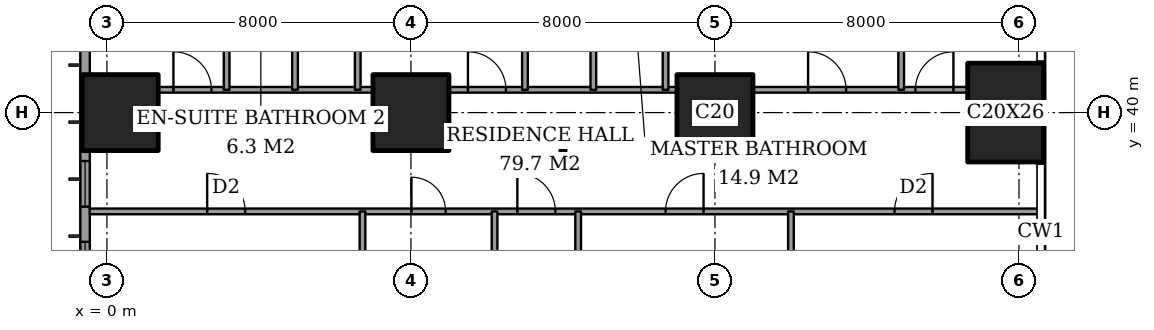
"""IFC4 building model, lengths in metres.
Left out: names, types, materials, properties, quantities, classifications, styles, units other than length and angle.
Written with IfcOpenShell. Run it as: python <this file> out.ifc"""

import sys

from ifc_helpers import new_model, si_unit, direction, frame, frame_2d, origin, origin_2d, place, context, subcontext, project, spatial, rectangle, extrude, element, fill, save


model = new_model("IFC4")
c1 = context("Model", 3, precision=1e-05, world=origin(), true_north=direction((0.0, 1.0)))
c2 = subcontext(c1, "Body", "Model", "MODEL_VIEW")
j1 = project(units=[si_unit("LENGTHUNIT", "METRE"), si_unit("PLANEANGLEUNIT", "RADIAN")], contexts=[c1])
p1 = place(None, origin())
s1 = spatial("IfcSite", under=j1, at=p1, CompositionType="ELEMENT")
p2 = place(p1, origin())
s2 = spatial("IfcBuilding", under=s1, at=p2, CompositionType="ELEMENT")
p3 = place(p2, frame((0.0, 0.0, 117.8)))
s3 = spatial("IfcBuildingStorey", under=s2, at=p3, CompositionType="ELEMENT", Elevation=117.8)
for number, where, z_axis, x_axis in (
    (1, (0.35, 40.0, 0.0), (0.0, 0.0, 1.0), (1.0, 0.0, 0.0)),
    (2, (8.0, 40.0, 0.0), (0.0, 0.0, 1.0), (1.0, 0.0, 0.0)),
    (3, (16.0, 40.0, 0.0), (0.0, 0.0, 1.0), (1.0, 0.0, 0.0)),
):
    element("IfcColumn", number, at=place(p3, frame(where, z_axis=z_axis, x_axis=x_axis)), inside=s3, PredefinedType="COLUMN", context=c2, shape_type="SweptSolid", body=[
        extrude(rectangle(XDim=2.0, YDim=2.0, at=origin_2d()), origin(), (0.0, 0.0, 1.0), 3.6),
    ])
p4 = place(p3, frame((23.65, 40.0, 0.0), z_axis=(0.0, 0.0, 1.0), x_axis=(1.0, 0.0, 0.0)))
e4 = element("IfcColumn", 4, at=p4, inside=s3, PredefinedType="COLUMN", context=c2, shape_type="SweptSolid", body=[
    extrude(rectangle(XDim=2.0, YDim=2.6, at=origin_2d()), origin(), (0.0, 0.0, 1.0), 3.6),
])
p5 = place(p3, frame((-0.575, 44.825, 0.0), z_axis=(0.0, 0.0, 1.0), x_axis=(0.0, -1.0, 0.0)))
e5 = element("IfcWall", 5, at=p5, inside=s3, PredefinedType="SOLIDWALL", context=c2, shape_type="SweptSolid", body=[
    extrude(rectangle(XDim=41.65, YDim=0.25, at=frame_2d((20.825, 0.0))), origin(), (0.0, 0.0, 1.0), 3.6),
])
p6 = place(p5, frame((0.775, 0.0, 0.4)))
e6 = element("IfcOpeningElement", 6, at=p6, cuts=e5, PredefinedType="OPENING", context=c2, shape_type="SweptSolid", body=[
    extrude(rectangle(XDim=2.4, YDim=2.2, at=frame_2d((1.2, 1.1))), frame((0.0, 0.135, 0.0), z_axis=(0.0, -1.0, 0.0), x_axis=(1.0, 0.0, 0.0)), (0.0, 0.0, 1.0), 0.27),
])
p7 = place(p5, frame((6.1, 0.0, 0.4)))
e7 = element("IfcOpeningElement", 7, at=p7, cuts=e5, PredefinedType="OPENING", context=c2, shape_type="SweptSolid", body=[
    extrude(rectangle(XDim=1.2, YDim=2.2, at=frame_2d((0.6, 1.1))), frame((0.0, 0.135, 0.0), z_axis=(0.0, -1.0, 0.0), x_axis=(1.0, 0.0, 0.0)), (0.0, 0.0, 1.0), 0.27),
])
p8 = place(p5, frame((8.225, 0.0, 0.4)))
e8 = element("IfcOpeningElement", 8, at=p8, cuts=e5, PredefinedType="OPENING", context=c2, shape_type="SweptSolid", body=[
    extrude(rectangle(XDim=2.4, YDim=2.2, at=frame_2d((1.2, 1.1))), frame((0.0, 0.135, 0.0), z_axis=(0.0, -1.0, 0.0), x_axis=(1.0, 0.0, 0.0)), (0.0, 0.0, 1.0), 0.27),
])
p9 = place(p5, frame((15.625, 0.0, 0.4)))
e9 = element("IfcOpeningElement", 9, at=p9, cuts=e5, PredefinedType="OPENING", context=c2, shape_type="SweptSolid", body=[
    extrude(rectangle(XDim=2.4, YDim=2.2, at=frame_2d((1.2, 1.1))), frame((0.0, 0.135, 0.0), z_axis=(0.0, -1.0, 0.0), x_axis=(1.0, 0.0, 0.0)), (0.0, 0.0, 1.0), 0.27),
])
p10 = place(p5, frame((23.625, 0.0, 0.4)))
e10 = element("IfcOpeningElement", 10, at=p10, cuts=e5, PredefinedType="OPENING", context=c2, shape_type="SweptSolid", body=[
    extrude(rectangle(XDim=2.4, YDim=2.2, at=frame_2d((1.2, 1.1))), frame((0.0, 0.135, 0.0), z_axis=(0.0, -1.0, 0.0), x_axis=(1.0, 0.0, 0.0)), (0.0, 0.0, 1.0), 0.27),
])
p11 = place(p5, frame((30.825, 0.0, 0.4)))
e11 = element("IfcOpeningElement", 11, at=p11, cuts=e5, PredefinedType="OPENING", context=c2, shape_type="SweptSolid", body=[
    extrude(rectangle(XDim=2.4, YDim=2.2, at=frame_2d((1.2, 1.1))), frame((0.0, 0.135, 0.0), z_axis=(0.0, -1.0, 0.0), x_axis=(1.0, 0.0, 0.0)), (0.0, 0.0, 1.0), 0.27),
])
p12 = place(p5, frame((34.5, 0.0, 0.4)))
e12 = element("IfcOpeningElement", 12, at=p12, cuts=e5, PredefinedType="OPENING", context=c2, shape_type="SweptSolid", body=[
    extrude(rectangle(XDim=1.2, YDim=2.2, at=frame_2d((0.6, 1.1))), frame((0.0, 0.135, 0.0), z_axis=(0.0, -1.0, 0.0), x_axis=(1.0, 0.0, 0.0)), (0.0, 0.0, 1.0), 0.27),
])
p13 = place(p5, frame((38.475, 0.0, 0.4)))
e13 = element("IfcOpeningElement", 13, at=p13, cuts=e5, PredefinedType="OPENING", context=c2, shape_type="SweptSolid", body=[
    extrude(rectangle(XDim=2.4, YDim=2.2, at=frame_2d((1.2, 1.1))), frame((0.0, 0.135, 0.0), z_axis=(0.0, -1.0, 0.0), x_axis=(1.0, 0.0, 0.0)), (0.0, 0.0, 1.0), 0.27),
])
p14 = place(p3, frame((-0.45, 37.4, 0.0), z_axis=(0.0, 0.0, 1.0), x_axis=(1.0, 0.0, 0.0)))
e14 = element("IfcWall", 14, at=p14, inside=s3, PredefinedType="PARTITIONING", context=c2, shape_type="SweptSolid", body=[
    extrude(rectangle(XDim=25.011, YDim=0.15, at=frame_2d((12.505, 0.0))), origin(), (0.0, 0.0, 1.0), 3.35),
])
p15 = place(p14, frame((11.25, 0.0, 0.0)))
e15 = element("IfcOpeningElement", 15, at=p15, cuts=e14, PredefinedType="OPENING", context=c2, shape_type="SweptSolid", body=[
    extrude(rectangle(XDim=1.0, YDim=2.1, at=frame_2d((0.5, 1.05))), frame((0.0, 0.085, 0.0), z_axis=(0.0, -1.0, 0.0), x_axis=(1.0, 0.0, 0.0)), (0.0, 0.0, 1.0), 0.17),
])
p16 = place(p14, frame((3.087, 0.0, 0.0)))
e16 = element("IfcOpeningElement", 16, at=p16, cuts=e14, PredefinedType="OPENING", context=c2, shape_type="SweptSolid", body=[
    extrude(rectangle(XDim=1.0, YDim=2.1, at=frame_2d((0.5, 1.05))), frame((0.0, 0.085, 0.0), z_axis=(0.0, -1.0, 0.0), x_axis=(1.0, 0.0, 0.0)), (0.0, 0.0, 1.0), 0.17),
])
p17 = place(p14, frame((8.462, 0.0, 0.0)))
e17 = element("IfcOpeningElement", 17, at=p17, cuts=e14, PredefinedType="OPENING", context=c2, shape_type="SweptSolid", body=[
    extrude(rectangle(XDim=0.9, YDim=2.1, at=frame_2d((0.45, 1.05))), frame((0.0, 0.085, 0.0), z_axis=(0.0, -1.0, 0.0), x_axis=(1.0, 0.0, 0.0)), (0.0, 0.0, 1.0), 0.17),
])
p18 = place(p14, frame((15.15, 0.0, 0.0)))
e18 = element("IfcOpeningElement", 18, at=p18, cuts=e14, PredefinedType="OPENING", context=c2, shape_type="SweptSolid", body=[
    extrude(rectangle(XDim=1.0, YDim=2.1, at=frame_2d((0.5, 1.05))), frame((0.0, 0.085, 0.0), z_axis=(0.0, -1.0, 0.0), x_axis=(1.0, 0.0, 0.0)), (0.0, 0.0, 1.0), 0.17),
])
p19 = place(p14, frame((21.175, 0.0, 0.0)))
e19 = element("IfcOpeningElement", 19, at=p19, cuts=e14, PredefinedType="OPENING", context=c2, shape_type="SweptSolid", body=[
    extrude(rectangle(XDim=1.0, YDim=2.1, at=frame_2d((0.5, 1.05))), frame((0.0, 0.085, 0.0), z_axis=(0.0, -1.0, 0.0), x_axis=(1.0, 0.0, 0.0)), (0.0, 0.0, 1.0), 0.17),
])
p20 = place(p3, frame((1.35, 40.6, 0.0), z_axis=(0.0, 0.0, 1.0), x_axis=(1.0, 0.0, 0.0)))
e20 = element("IfcWall", 20, at=p20, inside=s3, PredefinedType="PARTITIONING", context=c2, shape_type="SweptSolid", body=[
    extrude(rectangle(XDim=5.65, YDim=0.15, at=frame_2d((2.825, 0.0))), origin(), (0.0, 0.0, 1.0), 3.35),
])
p21 = place(p20, frame((0.4, 0.0, 0.0)))
e21 = element("IfcOpeningElement", 21, at=p21, cuts=e20, PredefinedType="OPENING", context=c2, shape_type="SweptSolid", body=[
    extrude(rectangle(XDim=1.0, YDim=2.1, at=frame_2d((0.5, 1.05))), frame((0.0, 0.085, 0.0), z_axis=(0.0, -1.0, 0.0), x_axis=(1.0, 0.0, 0.0)), (0.0, 0.0, 1.0), 0.17),
])
p22 = place(p3, frame((9.0, 40.6, 0.0), z_axis=(0.0, 0.0, 1.0), x_axis=(1.0, 0.0, 0.0)))
e22 = element("IfcWall", 22, at=p22, inside=s3, PredefinedType="PARTITIONING", context=c2, shape_type="SweptSolid", body=[
    extrude(rectangle(XDim=6.0, YDim=0.15, at=frame_2d((3.0, 0.0))), origin(), (0.0, 0.0, 1.0), 3.35),
])
p23 = place(p22, frame((0.5, 0.0, 0.0)))
e23 = element("IfcOpeningElement", 23, at=p23, cuts=e22, PredefinedType="OPENING", context=c2, shape_type="SweptSolid", body=[
    extrude(rectangle(XDim=1.0, YDim=2.1, at=frame_2d((0.5, 1.05))), frame((0.0, 0.085, 0.0), z_axis=(0.0, -1.0, 0.0), x_axis=(1.0, 0.0, 0.0)), (0.0, 0.0, 1.0), 0.17),
])
p24 = place(p3, frame((17.0, 40.6, 0.0), z_axis=(0.0, 0.0, 1.0), x_axis=(1.0, 0.0, 0.0)))
e24 = element("IfcWall", 24, at=p24, inside=s3, PredefinedType="PARTITIONING", context=c2, shape_type="SweptSolid", body=[
    extrude(rectangle(XDim=5.65, YDim=0.15, at=frame_2d((2.825, 0.0))), origin(), (0.0, 0.0, 1.0), 3.35),
])
p25 = place(p24, frame((1.45, 0.0, 0.0)))
e25 = element("IfcOpeningElement", 25, at=p25, cuts=e24, PredefinedType="OPENING", context=c2, shape_type="SweptSolid", body=[
    extrude(rectangle(XDim=1.0, YDim=2.1, at=frame_2d((0.5, 1.05))), frame((0.0, 0.085, 0.0), z_axis=(0.0, -1.0, 0.0), x_axis=(1.0, 0.0, 0.0)), (0.0, 0.0, 1.0), 0.17),
])
p26 = place(p24, frame((4.275, 0.0, 0.0)))
e26 = element("IfcOpeningElement", 26, at=p26, cuts=e24, PredefinedType="OPENING", context=c2, shape_type="SweptSolid", body=[
    extrude(rectangle(XDim=1.0, YDim=2.1, at=frame_2d((0.5, 1.05))), frame((0.0, 0.085, 0.0), z_axis=(0.0, -1.0, 0.0), x_axis=(1.0, 0.0, 0.0)), (0.0, 0.0, 1.0), 0.17),
])
p27 = place(p3, frame((3.15, 40.6, 0.0), z_axis=(0.0, 0.0, 1.0), x_axis=(0.0, 1.0, 0.0)))
e27 = element("IfcWall", 27, at=p27, inside=s3, PredefinedType="PARTITIONING", context=c2, shape_type="SweptSolid", body=[
    extrude(rectangle(XDim=3.5, YDim=0.15, at=frame_2d((1.75, 0.0))), origin(), (0.0, 0.0, 1.0), 3.35),
])
p28 = place(p27, frame((1.3, 0.0, 0.0)))
e28 = element("IfcOpeningElement", 28, at=p28, cuts=e27, PredefinedType="OPENING", context=c2, shape_type="SweptSolid", body=[
    extrude(rectangle(XDim=0.9, YDim=2.1, at=frame_2d((0.45, 1.05))), frame((0.0, 0.085, 0.0), z_axis=(0.0, -1.0, 0.0), x_axis=(1.0, 0.0, 0.0)), (0.0, 0.0, 1.0), 0.17),
])
p29 = place(p3, frame((4.95, 40.6, 0.0), z_axis=(0.0, 0.0, 1.0), x_axis=(0.0, 1.0, 0.0)))
e29 = element("IfcWall", 29, at=p29, inside=s3, PredefinedType="PARTITIONING", context=c2, shape_type="SweptSolid", body=[
    extrude(rectangle(XDim=7.85, YDim=0.15, at=frame_2d((3.925, 0.0))), origin(), (0.0, 0.0, 1.0), 3.35),
])
p30 = place(p29, frame((5.225, 0.0, 0.0)))
e30 = element("IfcOpeningElement", 30, at=p30, cuts=e29, PredefinedType="OPENING", context=c2, shape_type="SweptSolid", body=[
    extrude(rectangle(XDim=0.9, YDim=2.1, at=frame_2d((0.45, 1.05))), frame((0.0, 0.085, 0.0), z_axis=(0.0, -1.0, 0.0), x_axis=(1.0, 0.0, 0.0)), (0.0, 0.0, 1.0), 0.17),
])
p31 = place(p3, frame((6.6, 40.6, 0.0), z_axis=(0.0, 0.0, 1.0), x_axis=(0.0, 1.0, 0.0)))
e31 = element("IfcWall", 31, at=p31, inside=s3, PredefinedType="PARTITIONING", context=c2, shape_type="SweptSolid", body=[
    extrude(rectangle(XDim=7.85, YDim=0.15, at=frame_2d((3.925, 0.0))), origin(), (0.0, 0.0, 1.0), 3.35),
])
p32 = place(p3, frame((6.725, 33.2, 0.0), z_axis=(0.0, 0.0, 1.0), x_axis=(0.0, 1.0, 0.0)))
e32 = element("IfcWall", 32, at=p32, inside=s3, PredefinedType="PARTITIONING", context=c2, shape_type="SweptSolid", body=[
    extrude(rectangle(XDim=4.2, YDim=0.15, at=frame_2d((2.1, 0.0))), origin(), (0.0, 0.0, 1.0), 3.35),
])
p33 = place(p3, frame((10.2, 28.0, 0.0), z_axis=(0.0, 0.0, 1.0), x_axis=(0.0, 1.0, 0.0)))
e33 = element("IfcWall", 33, at=p33, inside=s3, PredefinedType="PARTITIONING", context=c2, shape_type="SweptSolid", body=[
    extrude(rectangle(XDim=9.4, YDim=0.15, at=frame_2d((4.7, 0.0))), origin(), (0.0, 0.0, 1.0), 3.35),
])
p34 = place(p33, frame((0.837, 0.0, 0.0)))
e34 = element("IfcOpeningElement", 34, at=p34, cuts=e33, PredefinedType="OPENING", context=c2, shape_type="SweptSolid", body=[
    extrude(rectangle(XDim=1.0, YDim=2.1, at=frame_2d((0.5, 1.05))), frame((0.0, 0.085, 0.0), z_axis=(0.0, -1.0, 0.0), x_axis=(1.0, 0.0, 0.0)), (0.0, 0.0, 1.0), 0.17),
])
p35 = place(p3, frame((11.0, 40.6, 0.0), z_axis=(0.0, 0.0, 1.0), x_axis=(0.0, 1.0, 0.0)))
e35 = element("IfcWall", 35, at=p35, inside=s3, PredefinedType="PARTITIONING", context=c2, shape_type="SweptSolid", body=[
    extrude(rectangle(XDim=7.85, YDim=0.15, at=frame_2d((3.925, 0.0))), origin(), (0.0, 0.0, 1.0), 3.35),
])
p36 = place(p35, frame((3.475, 0.0, 0.0)))
e36 = element("IfcOpeningElement", 36, at=p36, cuts=e35, PredefinedType="OPENING", context=c2, shape_type="SweptSolid", body=[
    extrude(rectangle(XDim=0.9, YDim=2.1, at=frame_2d((0.45, 1.05))), frame((0.0, 0.085, 0.0), z_axis=(0.0, -1.0, 0.0), x_axis=(1.0, 0.0, 0.0)), (0.0, 0.0, 1.0), 0.17),
])
p37 = place(p3, frame((12.4, 30.675, 0.0), z_axis=(0.0, 0.0, 1.0), x_axis=(0.0, 1.0, 0.0)))
e37 = element("IfcWall", 37, at=p37, inside=s3, PredefinedType="PARTITIONING", context=c2, shape_type="SweptSolid", body=[
    extrude(rectangle(XDim=6.725, YDim=0.15, at=frame_2d((3.362, 0.0))), origin(), (0.0, 0.0, 1.0), 3.35),
])
p38 = place(p3, frame((12.8, 40.6, 0.0), z_axis=(0.0, 0.0, 1.0), x_axis=(0.0, 1.0, 0.0)))
e38 = element("IfcWall", 38, at=p38, inside=s3, PredefinedType="PARTITIONING", context=c2, shape_type="SweptSolid", body=[
    extrude(rectangle(XDim=7.85, YDim=0.15, at=frame_2d((3.925, 0.0))), origin(), (0.0, 0.0, 1.0), 3.35),
])
p39 = place(p3, frame((14.7, 40.6, 0.0), z_axis=(0.0, 0.0, 1.0), x_axis=(0.0, 1.0, 0.0)))
e39 = element("IfcWall", 39, at=p39, inside=s3, PredefinedType="PARTITIONING", context=c2, shape_type="SweptSolid", body=[
    extrude(rectangle(XDim=7.85, YDim=0.15, at=frame_2d((3.925, 0.0))), origin(), (0.0, 0.0, 1.0), 3.35),
])
p40 = place(p39, frame((3.475, 0.0, 0.0)))
e40 = element("IfcOpeningElement", 40, at=p40, cuts=e39, PredefinedType="OPENING", context=c2, shape_type="SweptSolid", body=[
    extrude(rectangle(XDim=0.9, YDim=2.1, at=frame_2d((0.45, 1.05))), frame((0.0, 0.085, 0.0), z_axis=(0.0, -1.0, 0.0), x_axis=(1.0, 0.0, 0.0)), (0.0, 0.0, 1.0), 0.17),
])
p41 = place(p3, frame((18.0, 28.0, 0.0), z_axis=(0.0, 0.0, 1.0), x_axis=(0.0, 1.0, 0.0)))
e41 = element("IfcWall", 41, at=p41, inside=s3, PredefinedType="PARTITIONING", context=c2, shape_type="SweptSolid", body=[
    extrude(rectangle(XDim=9.4, YDim=0.15, at=frame_2d((4.7, 0.0))), origin(), (0.0, 0.0, 1.0), 3.35),
])
p42 = place(p41, frame((0.837, 0.0, 0.0)))
e42 = element("IfcOpeningElement", 42, at=p42, cuts=e41, PredefinedType="OPENING", context=c2, shape_type="SweptSolid", body=[
    extrude(rectangle(XDim=1.0, YDim=2.1, at=frame_2d((0.5, 1.05))), frame((0.0, 0.085, 0.0), z_axis=(0.0, -1.0, 0.0), x_axis=(1.0, 0.0, 0.0)), (0.0, 0.0, 1.0), 0.17),
])
p43 = place(p3, frame((20.9, 40.6, 0.0), z_axis=(0.0, 0.0, 1.0), x_axis=(0.0, 1.0, 0.0)))
e43 = element("IfcWall", 43, at=p43, inside=s3, PredefinedType="PARTITIONING", context=c2, shape_type="SweptSolid", body=[
    extrude(rectangle(XDim=7.85, YDim=0.15, at=frame_2d((3.925, 0.0))), origin(), (0.0, 0.0, 1.0), 3.35),
])
p44 = place(p7, origin())
e44 = element("IfcWindow", 44, at=p44, inside=s3, PartitioningType="SINGLE_PANEL", PredefinedType="WINDOW", context=c2, shape_type="SweptSolid", body=[
    extrude(rectangle(XDim=1.2, YDim=2.2, at=frame_2d((0.6, 1.1))), frame((0.0, 0.03, 0.0), z_axis=(0.0, -1.0, 0.0), x_axis=(1.0, 0.0, 0.0)), (0.0, 0.0, 1.0), 0.06),
])
fill(e7, e44)
p45 = place(p8, origin())
e45 = element("IfcWindow", 45, at=p45, inside=s3, PartitioningType="SINGLE_PANEL", PredefinedType="WINDOW", context=c2, shape_type="SweptSolid", body=[
    extrude(rectangle(XDim=2.4, YDim=2.2, at=frame_2d((1.2, 1.1))), frame((0.0, 0.03, 0.0), z_axis=(0.0, -1.0, 0.0), x_axis=(1.0, 0.0, 0.0)), (0.0, 0.0, 1.0), 0.06),
])
fill(e8, e45)
p46 = place(p21, origin())
e46 = element("IfcDoor", 46, at=p46, inside=s3, OperationType="SINGLE_SWING_RIGHT", PredefinedType="DOOR", context=c2, shape_type="SweptSolid", body=[
    extrude(rectangle(XDim=1.0, YDim=2.1, at=frame_2d((0.5, 1.05))), frame((0.0, 0.025, 0.0), z_axis=(0.0, -1.0, 0.0), x_axis=(1.0, 0.0, 0.0)), (0.0, 0.0, 1.0), 0.05),
])
fill(e21, e46)
p47 = place(p23, origin())
e47 = element("IfcDoor", 47, at=p47, inside=s3, OperationType="SINGLE_SWING_RIGHT", PredefinedType="DOOR", context=c2, shape_type="SweptSolid", body=[
    extrude(rectangle(XDim=1.0, YDim=2.1, at=frame_2d((0.5, 1.05))), frame((0.0, 0.025, 0.0), z_axis=(0.0, -1.0, 0.0), x_axis=(1.0, 0.0, 0.0)), (0.0, 0.0, 1.0), 0.05),
])
fill(e23, e47)
p48 = place(p25, origin())
e48 = element("IfcDoor", 48, at=p48, inside=s3, OperationType="SINGLE_SWING_RIGHT", PredefinedType="DOOR", context=c2, shape_type="SweptSolid", body=[
    extrude(rectangle(XDim=1.0, YDim=2.1, at=frame_2d((0.5, 1.05))), frame((0.0, 0.025, 0.0), z_axis=(0.0, -1.0, 0.0), x_axis=(1.0, 0.0, 0.0)), (0.0, 0.0, 1.0), 0.05),
])
fill(e25, e48)
p49 = place(p26, origin())
e49 = element("IfcDoor", 49, at=p49, inside=s3, OperationType="SINGLE_SWING_LEFT", PredefinedType="DOOR", context=c2, shape_type="SweptSolid", body=[
    extrude(rectangle(XDim=1.0, YDim=2.1, at=frame_2d((0.5, 1.05))), frame((0.0, 0.025, 0.0), z_axis=(0.0, -1.0, 0.0), x_axis=(1.0, 0.0, 0.0)), (0.0, 0.0, 1.0), 0.05),
])
fill(e26, e49)
p50 = place(p15, origin())
e50 = element("IfcDoor", 50, at=p50, inside=s3, OperationType="SINGLE_SWING_RIGHT", PredefinedType="DOOR", context=c2, shape_type="SweptSolid", body=[
    extrude(rectangle(XDim=1.0, YDim=2.1, at=frame_2d((0.5, 1.05))), frame((0.0, 0.025, 0.0), z_axis=(0.0, -1.0, 0.0), x_axis=(1.0, 0.0, 0.0)), (0.0, 0.0, 1.0), 0.05),
])
fill(e15, e50)
p51 = place(p16, origin())
e51 = element("IfcDoor", 51, at=p51, inside=s3, OperationType="SINGLE_SWING_RIGHT", PredefinedType="DOOR", context=c2, shape_type="SweptSolid", body=[
    extrude(rectangle(XDim=1.0, YDim=2.1, at=frame_2d((0.5, 1.05))), frame((0.0, 0.025, 0.0), z_axis=(0.0, -1.0, 0.0), x_axis=(1.0, 0.0, 0.0)), (0.0, 0.0, 1.0), 0.05),
])
fill(e16, e51)
p52 = place(p17, origin())
e52 = element("IfcDoor", 52, at=p52, inside=s3, OperationType="SINGLE_SWING_RIGHT", PredefinedType="DOOR", context=c2, shape_type="SweptSolid", body=[
    extrude(rectangle(XDim=0.9, YDim=2.1, at=frame_2d((0.45, 1.05))), frame((0.0, 0.025, 0.0), z_axis=(0.0, -1.0, 0.0), x_axis=(1.0, 0.0, 0.0)), (0.0, 0.0, 1.0), 0.05),
])
fill(e17, e52)
p53 = place(p18, origin())
e53 = element("IfcDoor", 53, at=p53, inside=s3, OperationType="SINGLE_SWING_LEFT", PredefinedType="DOOR", context=c2, shape_type="SweptSolid", body=[
    extrude(rectangle(XDim=1.0, YDim=2.1, at=frame_2d((0.5, 1.05))), frame((0.0, 0.025, 0.0), z_axis=(0.0, -1.0, 0.0), x_axis=(1.0, 0.0, 0.0)), (0.0, 0.0, 1.0), 0.05),
])
fill(e18, e53)
p54 = place(p19, origin())
e54 = element("IfcDoor", 54, at=p54, inside=s3, OperationType="SINGLE_SWING_LEFT", PredefinedType="DOOR", context=c2, shape_type="SweptSolid", body=[
    extrude(rectangle(XDim=1.0, YDim=2.1, at=frame_2d((0.5, 1.05))), frame((0.0, 0.025, 0.0), z_axis=(0.0, -1.0, 0.0), x_axis=(1.0, 0.0, 0.0)), (0.0, 0.0, 1.0), 0.05),
])
fill(e19, e54)
save(model, sys.argv[1])
